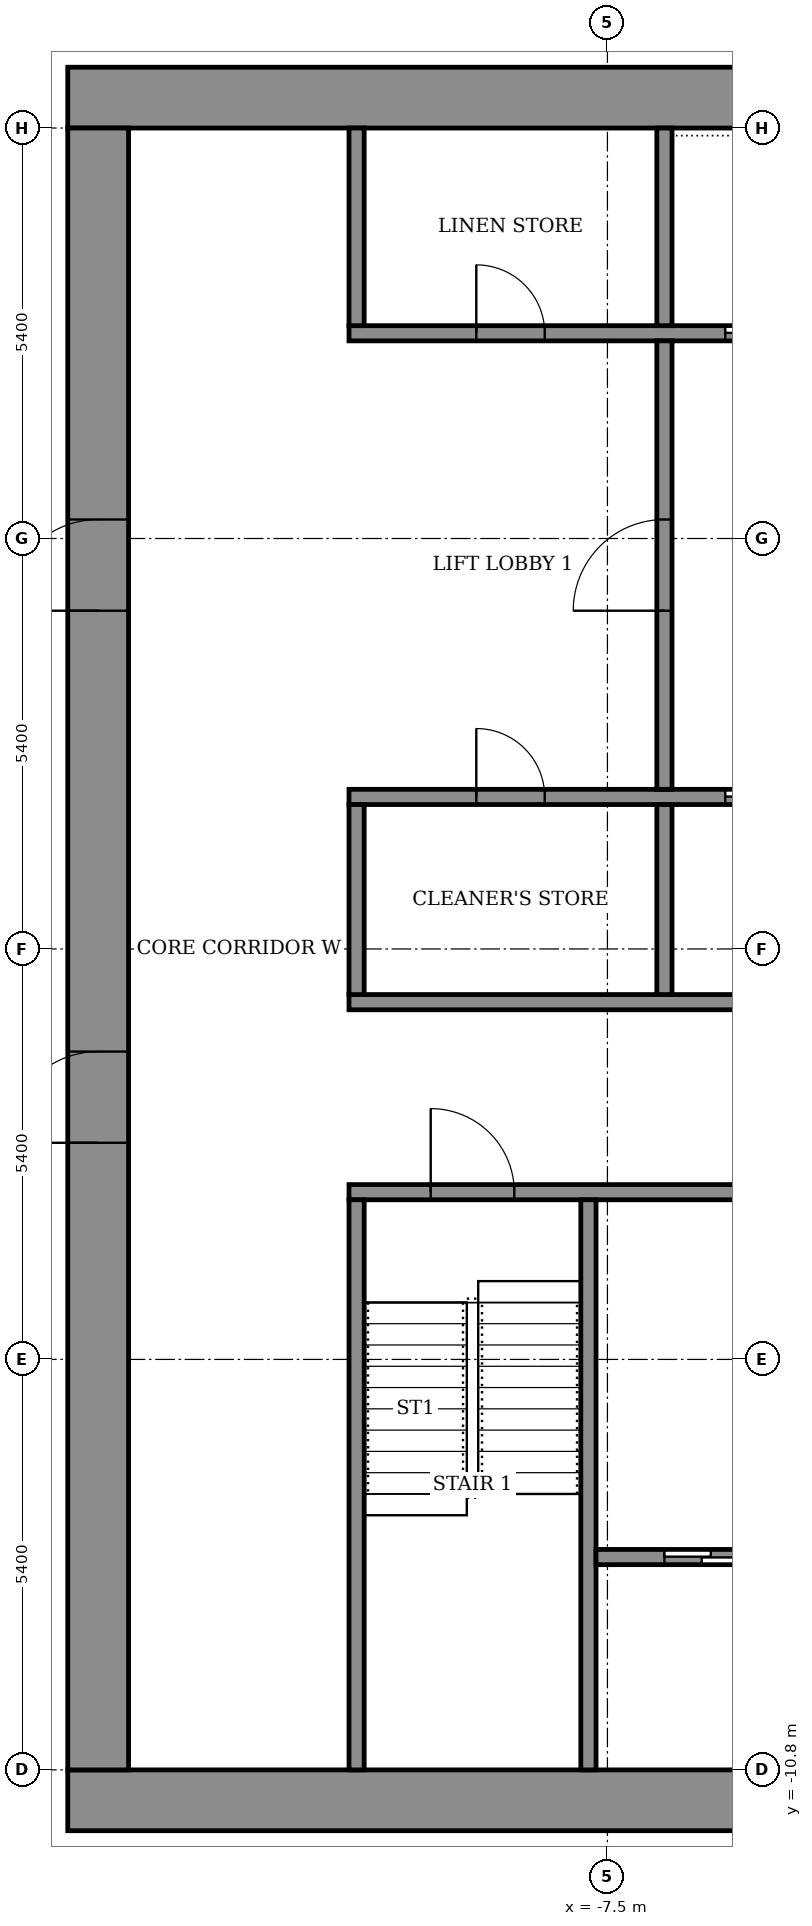
"""IFC4 building model, lengths in metres.
Left out: names, types, materials, properties, quantities, classifications, styles, units other than length and angle.
Written with IfcOpenShell. Run it as: python <this file> out.ifc"""

import sys

from ifc_helpers import new_model, si_unit, direction, frame, frame_2d, origin, place, context, subcontext, project, spatial, rectangle, extrude, element, fill, save


model = new_model("IFC4")
c1 = context("Model", 3, precision=1e-05, world=origin(), true_north=direction((0.0, 1.0)))
c2 = subcontext(c1, "Body", "Model", "MODEL_VIEW")
j1 = project(units=[si_unit("LENGTHUNIT", "METRE"), si_unit("PLANEANGLEUNIT", "RADIAN")], contexts=[c1])
p1 = place(None, origin())
s1 = spatial("IfcSite", under=j1, at=p1, CompositionType="ELEMENT")
p2 = place(p1, origin())
s2 = spatial("IfcBuilding", under=s1, at=p2, CompositionType="ELEMENT")
p3 = place(p2, frame((0.0, 0.0, 245.5)))
s3 = spatial("IfcBuildingStorey", under=s2, at=p3, CompositionType="ELEMENT", Elevation=245.5)
for number, where, z_axis, x_axis in (
    (1, (-14.6, -11.2, 0.0), (0.0, 0.0, 1.0), (1.0, 0.0, 0.0)),
    (2, (-14.6, 11.2, 0.0), (0.0, 0.0, 1.0), (1.0, 0.0, 0.0)),
):
    element("IfcWall", number, at=place(p3, frame(where, z_axis=z_axis, x_axis=x_axis)), inside=s3, PredefinedType="SHEAR", context=c2, shape_type="SweptSolid", body=[
        extrude(rectangle(XDim=29.2, YDim=0.8, at=frame_2d((14.6, 0.0))), origin(), (0.0, 0.0, 1.0), 3.6),
    ])
p4 = place(p3, frame((-14.2, -10.8, 0.0), z_axis=(0.0, 0.0, 1.0), x_axis=(0.0, 1.0, 0.0)))
e3 = element("IfcWall", 3, at=p4, inside=s3, PredefinedType="SHEAR", context=c2, shape_type="SweptSolid", body=[
    extrude(rectangle(XDim=21.6, YDim=0.8, at=frame_2d((10.8, 0.0))), origin(), (0.0, 0.0, 1.0), 3.6),
])
p5 = place(p4, frame((8.25, 0.0, 0.0)))
e4 = element("IfcOpeningElement", 4, at=p5, cuts=e3, PredefinedType="OPENING", context=c2, shape_type="SweptSolid", body=[
    extrude(rectangle(XDim=1.2, YDim=2.1, at=frame_2d((0.6, 1.05))), frame((0.0, 0.41, 0.0), z_axis=(0.0, -1.0, 0.0), x_axis=(1.0, 0.0, 0.0)), (0.0, 0.0, 1.0), 0.82),
])
p6 = place(p4, frame((15.25, 0.0, 0.0)))
e5 = element("IfcOpeningElement", 5, at=p6, cuts=e3, PredefinedType="OPENING", context=c2, shape_type="SweptSolid", body=[
    extrude(rectangle(XDim=1.2, YDim=2.1, at=frame_2d((0.6, 1.05))), frame((0.0, 0.41, 0.0), z_axis=(0.0, -1.0, 0.0), x_axis=(1.0, 0.0, 0.0)), (0.0, 0.0, 1.0), 0.82),
])
p7 = place(p3, frame((-10.9, -3.2, 0.0), z_axis=(0.0, 0.0, 1.0), x_axis=(1.0, 0.0, 0.0)))
e6 = element("IfcWall", 6, at=p7, inside=s3, PredefinedType="SHEAR", context=c2, shape_type="SweptSolid", body=[
    extrude(rectangle(XDim=21.8, YDim=0.2, at=frame_2d((10.9, 0.0))), origin(), (0.0, 0.0, 1.0), 3.05),
])
p8 = place(p7, frame((1.075, 0.0, 0.0)))
e7 = element("IfcOpeningElement", 7, at=p8, cuts=e6, PredefinedType="OPENING", context=c2, shape_type="SweptSolid", body=[
    extrude(rectangle(XDim=1.1, YDim=2.1, at=frame_2d((0.55, 1.05))), frame((0.0, 0.11, 0.0), z_axis=(0.0, -1.0, 0.0), x_axis=(1.0, 0.0, 0.0)), (0.0, 0.0, 1.0), 0.22),
])
p9 = place(p7, frame((10.325, 0.0, 0.0)))
e8 = element("IfcOpeningElement", 8, at=p9, cuts=e6, PredefinedType="OPENING", context=c2, shape_type="SweptSolid", body=[
    extrude(rectangle(XDim=1.1, YDim=2.1, at=frame_2d((0.55, 1.05))), frame((0.0, 0.11, 0.0), z_axis=(0.0, -1.0, 0.0), x_axis=(1.0, 0.0, 0.0)), (0.0, 0.0, 1.0), 0.22),
])
p10 = place(p7, frame((19.625, 0.0, 0.0)))
e9 = element("IfcOpeningElement", 9, at=p10, cuts=e6, PredefinedType="OPENING", context=c2, shape_type="SweptSolid", body=[
    extrude(rectangle(XDim=1.1, YDim=2.1, at=frame_2d((0.55, 1.05))), frame((0.0, 0.11, 0.0), z_axis=(0.0, -1.0, 0.0), x_axis=(1.0, 0.0, 0.0)), (0.0, 0.0, 1.0), 0.22),
])
p11 = place(p7, frame((5.7, 0.0, 0.0)))
e10 = element("IfcOpeningElement", 10, at=p11, cuts=e6, PredefinedType="OPENING", context=c2, shape_type="SweptSolid", body=[
    extrude(rectangle(XDim=1.1, YDim=2.1, at=frame_2d((0.55, 1.05))), frame((0.0, 0.11, 0.0), z_axis=(0.0, -1.0, 0.0), x_axis=(1.0, 0.0, 0.0)), (0.0, 0.0, 1.0), 0.22),
])
p12 = place(p7, frame((14.975, 0.0, 0.0)))
e11 = element("IfcOpeningElement", 11, at=p12, cuts=e6, PredefinedType="OPENING", context=c2, shape_type="SweptSolid", body=[
    extrude(rectangle(XDim=1.1, YDim=2.1, at=frame_2d((0.55, 1.05))), frame((0.0, 0.11, 0.0), z_axis=(0.0, -1.0, 0.0), x_axis=(1.0, 0.0, 0.0)), (0.0, 0.0, 1.0), 0.22),
])
p13 = place(p3, frame((-10.9, -0.7, 0.0), z_axis=(0.0, 0.0, 1.0), x_axis=(1.0, 0.0, 0.0)))
e12 = element("IfcWall", 12, at=p13, inside=s3, PredefinedType="SHEAR", context=c2, shape_type="SweptSolid", body=[
    extrude(rectangle(XDim=21.8, YDim=0.2, at=frame_2d((10.9, 0.0))), origin(), (0.0, 0.0, 1.0), 3.05),
])
p14 = place(p3, frame((-10.9, 2.0, 0.0), z_axis=(0.0, 0.0, 1.0), x_axis=(1.0, 0.0, 0.0)))
e13 = element("IfcWall", 13, at=p14, inside=s3, PredefinedType="SHEAR", context=c2, shape_type="SweptSolid", body=[
    extrude(rectangle(XDim=21.8, YDim=0.2, at=frame_2d((10.9, 0.0))), origin(), (0.0, 0.0, 1.0), 3.05),
])
p15 = place(p14, frame((4.95, 0.0, 0.0)))
e14 = element("IfcOpeningElement", 14, at=p15, cuts=e13, PredefinedType="OPENING", context=c2, shape_type="SweptSolid", body=[
    extrude(rectangle(XDim=1.1, YDim=2.1, at=frame_2d((0.55, 1.05))), frame((0.0, 0.11, 0.0), z_axis=(0.0, -1.0, 0.0), x_axis=(1.0, 0.0, 0.0)), (0.0, 0.0, 1.0), 0.22),
])
p16 = place(p14, frame((7.65, 0.0, 0.0)))
e15 = element("IfcOpeningElement", 15, at=p16, cuts=e13, PredefinedType="OPENING", context=c2, shape_type="SweptSolid", body=[
    extrude(rectangle(XDim=1.1, YDim=2.1, at=frame_2d((0.55, 1.05))), frame((0.0, 0.11, 0.0), z_axis=(0.0, -1.0, 0.0), x_axis=(1.0, 0.0, 0.0)), (0.0, 0.0, 1.0), 0.22),
])
p17 = place(p14, frame((10.35, 0.0, 0.0)))
e16 = element("IfcOpeningElement", 16, at=p17, cuts=e13, PredefinedType="OPENING", context=c2, shape_type="SweptSolid", body=[
    extrude(rectangle(XDim=1.1, YDim=2.1, at=frame_2d((0.55, 1.05))), frame((0.0, 0.11, 0.0), z_axis=(0.0, -1.0, 0.0), x_axis=(1.0, 0.0, 0.0)), (0.0, 0.0, 1.0), 0.22),
])
p18 = place(p14, frame((1.675, 0.0, 0.0)))
e17 = element("IfcOpeningElement", 17, at=p18, cuts=e13, PredefinedType="OPENING", context=c2, shape_type="SweptSolid", body=[
    extrude(rectangle(XDim=0.9, YDim=2.1, at=frame_2d((0.45, 1.05))), frame((0.0, 0.11, 0.0), z_axis=(0.0, -1.0, 0.0), x_axis=(1.0, 0.0, 0.0)), (0.0, 0.0, 1.0), 0.22),
])
p19 = place(p14, frame((14.5, 0.0, 0.0)))
e18 = element("IfcOpeningElement", 18, at=p19, cuts=e13, PredefinedType="OPENING", context=c2, shape_type="SweptSolid", body=[
    extrude(rectangle(XDim=0.9, YDim=2.1, at=frame_2d((0.45, 1.05))), frame((0.0, 0.11, 0.0), z_axis=(0.0, -1.0, 0.0), x_axis=(1.0, 0.0, 0.0)), (0.0, 0.0, 1.0), 0.22),
])
p20 = place(p14, frame((19.225, 0.0, 0.0)))
e19 = element("IfcOpeningElement", 19, at=p20, cuts=e13, PredefinedType="OPENING", context=c2, shape_type="SweptSolid", body=[
    extrude(rectangle(XDim=0.9, YDim=2.1, at=frame_2d((0.45, 1.05))), frame((0.0, 0.11, 0.0), z_axis=(0.0, -1.0, 0.0), x_axis=(1.0, 0.0, 0.0)), (0.0, 0.0, 1.0), 0.22),
])
p21 = place(p3, frame((-10.9, 8.1, 0.0), z_axis=(0.0, 0.0, 1.0), x_axis=(1.0, 0.0, 0.0)))
e20 = element("IfcWall", 20, at=p21, inside=s3, PredefinedType="SHEAR", context=c2, shape_type="SweptSolid", body=[
    extrude(rectangle(XDim=21.8, YDim=0.2, at=frame_2d((10.9, 0.0))), origin(), (0.0, 0.0, 1.0), 3.05),
])
p22 = place(p21, frame((4.95, 0.0, 0.0)))
e21 = element("IfcOpeningElement", 21, at=p22, cuts=e20, PredefinedType="OPENING", context=c2, shape_type="SweptSolid", body=[
    extrude(rectangle(XDim=1.1, YDim=2.1, at=frame_2d((0.55, 1.05))), frame((0.0, 0.11, 0.0), z_axis=(0.0, -1.0, 0.0), x_axis=(1.0, 0.0, 0.0)), (0.0, 0.0, 1.0), 0.22),
])
p23 = place(p21, frame((7.65, 0.0, 0.0)))
e22 = element("IfcOpeningElement", 22, at=p23, cuts=e20, PredefinedType="OPENING", context=c2, shape_type="SweptSolid", body=[
    extrude(rectangle(XDim=1.1, YDim=2.1, at=frame_2d((0.55, 1.05))), frame((0.0, 0.11, 0.0), z_axis=(0.0, -1.0, 0.0), x_axis=(1.0, 0.0, 0.0)), (0.0, 0.0, 1.0), 0.22),
])
p24 = place(p21, frame((10.35, 0.0, 0.0)))
e23 = element("IfcOpeningElement", 23, at=p24, cuts=e20, PredefinedType="OPENING", context=c2, shape_type="SweptSolid", body=[
    extrude(rectangle(XDim=1.1, YDim=2.1, at=frame_2d((0.55, 1.05))), frame((0.0, 0.11, 0.0), z_axis=(0.0, -1.0, 0.0), x_axis=(1.0, 0.0, 0.0)), (0.0, 0.0, 1.0), 0.22),
])
p25 = place(p21, frame((1.675, 0.0, 0.0)))
e24 = element("IfcOpeningElement", 24, at=p25, cuts=e20, PredefinedType="OPENING", context=c2, shape_type="SweptSolid", body=[
    extrude(rectangle(XDim=0.9, YDim=2.1, at=frame_2d((0.45, 1.05))), frame((0.0, 0.11, 0.0), z_axis=(0.0, -1.0, 0.0), x_axis=(1.0, 0.0, 0.0)), (0.0, 0.0, 1.0), 0.22),
])
p26 = place(p21, frame((14.5, 0.0, 0.0)))
e25 = element("IfcOpeningElement", 25, at=p26, cuts=e20, PredefinedType="OPENING", context=c2, shape_type="SweptSolid", body=[
    extrude(rectangle(XDim=0.9, YDim=2.1, at=frame_2d((0.45, 1.05))), frame((0.0, 0.11, 0.0), z_axis=(0.0, -1.0, 0.0), x_axis=(1.0, 0.0, 0.0)), (0.0, 0.0, 1.0), 0.22),
])
p27 = place(p21, frame((19.225, 0.0, 0.0)))
e26 = element("IfcOpeningElement", 26, at=p27, cuts=e20, PredefinedType="OPENING", context=c2, shape_type="SweptSolid", body=[
    extrude(rectangle(XDim=0.9, YDim=2.1, at=frame_2d((0.45, 1.05))), frame((0.0, 0.11, 0.0), z_axis=(0.0, -1.0, 0.0), x_axis=(1.0, 0.0, 0.0)), (0.0, 0.0, 1.0), 0.22),
])
for number, where, z_axis, x_axis in (
    (27, (-10.8, -10.8, 0.0), (0.0, 0.0, 1.0), (0.0, 1.0, 0.0)),
    (28, (-7.75, -10.8, 0.0), (0.0, 0.0, 1.0), (0.0, 1.0, 0.0)),
):
    element("IfcWall", number, at=place(p3, frame(where, z_axis=z_axis, x_axis=x_axis)), inside=s3, PredefinedType="SHEAR", context=c2, shape_type="SweptSolid", body=[
        extrude(rectangle(XDim=7.5, YDim=0.2, at=frame_2d((3.75, 0.0))), origin(), (0.0, 0.0, 1.0), 3.05),
    ])
p28 = place(p3, frame((-7.65, -8.0, 0.0), z_axis=(0.0, 0.0, 1.0), x_axis=(1.0, 0.0, 0.0)))
e29 = element("IfcWall", 29, at=p28, inside=s3, PredefinedType="SHEAR", context=c2, shape_type="SweptSolid", body=[
    extrude(rectangle(XDim=6.0, YDim=0.2, at=frame_2d((3.0, 0.0))), origin(), (0.0, 0.0, 1.0), 3.05),
])
p29 = place(p28, frame((0.9, 0.0, 0.0)))
e30 = element("IfcOpeningElement", 30, at=p29, cuts=e29, PredefinedType="OPENING", context=c2, shape_type="SweptSolid", body=[
    extrude(rectangle(XDim=1.1, YDim=2.1, at=frame_2d((0.55, 1.05))), frame((0.0, 0.11, 0.0), z_axis=(0.0, -1.0, 0.0), x_axis=(1.0, 0.0, 0.0)), (0.0, 0.0, 1.0), 0.22),
])
p30 = place(p28, frame((4.0, 0.0, 0.0)))
e31 = element("IfcOpeningElement", 31, at=p30, cuts=e29, PredefinedType="OPENING", context=c2, shape_type="SweptSolid", body=[
    extrude(rectangle(XDim=1.1, YDim=2.1, at=frame_2d((0.55, 1.05))), frame((0.0, 0.11, 0.0), z_axis=(0.0, -1.0, 0.0), x_axis=(1.0, 0.0, 0.0)), (0.0, 0.0, 1.0), 0.22),
])
p31 = place(p3, frame((-10.8, -0.6, 0.0), z_axis=(0.0, 0.0, 1.0), x_axis=(0.0, 1.0, 0.0)))
e32 = element("IfcWall", 32, at=p31, inside=s3, PredefinedType="STANDARD", context=c2, shape_type="SweptSolid", body=[
    extrude(rectangle(XDim=2.5, YDim=0.2, at=frame_2d((1.25, 0.0))), origin(), (0.0, 0.0, 1.0), 3.05),
])
p32 = place(p3, frame((-6.75, -0.6, 0.0), z_axis=(0.0, 0.0, 1.0), x_axis=(0.0, 1.0, 0.0)))
e33 = element("IfcWall", 33, at=p32, inside=s3, PredefinedType="SHEAR", context=c2, shape_type="SweptSolid", body=[
    extrude(rectangle(XDim=2.5, YDim=0.2, at=frame_2d((1.25, 0.0))), origin(), (0.0, 0.0, 1.0), 3.05),
])
p33 = place(p3, frame((-10.8, 8.2, 0.0), z_axis=(0.0, 0.0, 1.0), x_axis=(0.0, 1.0, 0.0)))
e34 = element("IfcWall", 34, at=p33, inside=s3, PredefinedType="STANDARD", context=c2, shape_type="SweptSolid", body=[
    extrude(rectangle(XDim=2.6, YDim=0.2, at=frame_2d((1.3, 0.0))), origin(), (0.0, 0.0, 1.0), 3.05),
])
p34 = place(p3, frame((-6.75, 8.2, 0.0), z_axis=(0.0, 0.0, 1.0), x_axis=(0.0, 1.0, 0.0)))
e35 = element("IfcWall", 35, at=p34, inside=s3, PredefinedType="SHEAR", context=c2, shape_type="SweptSolid", body=[
    extrude(rectangle(XDim=2.6, YDim=0.2, at=frame_2d((1.3, 0.0))), origin(), (0.0, 0.0, 1.0), 3.05),
])
p35 = place(p3, frame((-6.75, 2.1, 0.0), z_axis=(0.0, 0.0, 1.0), x_axis=(0.0, 1.0, 0.0)))
e36 = element("IfcWall", 36, at=p35, inside=s3, PredefinedType="STANDARD", context=c2, shape_type="SweptSolid", body=[
    extrude(rectangle(XDim=5.9, YDim=0.2, at=frame_2d((2.95, 0.0))), origin(), (0.0, 0.0, 1.0), 3.05),
])
p36 = place(p35, frame((2.35, 0.0, 0.0)))
e37 = element("IfcOpeningElement", 37, at=p36, cuts=e36, PredefinedType="OPENING", context=c2, shape_type="SweptSolid", body=[
    extrude(rectangle(XDim=1.2, YDim=2.1, at=frame_2d((0.6, 1.05))), frame((0.0, 0.11, 0.0), z_axis=(0.0, -1.0, 0.0), x_axis=(1.0, 0.0, 0.0)), (0.0, 0.0, 1.0), 0.22),
])
p37 = place(p5, origin())
e38 = element("IfcDoor", 38, at=p37, inside=s3, OperationType="DOUBLE_DOOR_SINGLE_SWING", PredefinedType="DOOR", context=c2, shape_type="SweptSolid", body=[
    extrude(rectangle(XDim=1.2, YDim=2.1, at=frame_2d((0.6, 1.05))), frame((0.0, 0.025, 0.0), z_axis=(0.0, -1.0, 0.0), x_axis=(1.0, 0.0, 0.0)), (0.0, 0.0, 1.0), 0.05),
])
fill(e4, e38)
p38 = place(p6, origin())
e39 = element("IfcDoor", 39, at=p38, inside=s3, OperationType="DOUBLE_DOOR_SINGLE_SWING", PredefinedType="DOOR", context=c2, shape_type="SweptSolid", body=[
    extrude(rectangle(XDim=1.2, YDim=2.1, at=frame_2d((0.6, 1.05))), frame((0.0, 0.025, 0.0), z_axis=(0.0, -1.0, 0.0), x_axis=(1.0, 0.0, 0.0)), (0.0, 0.0, 1.0), 0.05),
])
fill(e5, e39)
p39 = place(p15, origin())
e40 = element("IfcDoor", 40, at=p39, inside=s3, OperationType="SLIDING_TO_LEFT", PredefinedType="DOOR", context=c2, shape_type="SweptSolid", body=[
    extrude(rectangle(XDim=1.1, YDim=2.1, at=frame_2d((0.55, 1.05))), frame((0.0, 0.025, 0.0), z_axis=(0.0, -1.0, 0.0), x_axis=(1.0, 0.0, 0.0)), (0.0, 0.0, 1.0), 0.05),
])
fill(e14, e40)
p40 = place(p22, origin())
e41 = element("IfcDoor", 41, at=p40, inside=s3, OperationType="SLIDING_TO_LEFT", PredefinedType="DOOR", context=c2, shape_type="SweptSolid", body=[
    extrude(rectangle(XDim=1.1, YDim=2.1, at=frame_2d((0.55, 1.05))), frame((0.0, 0.025, 0.0), z_axis=(0.0, -1.0, 0.0), x_axis=(1.0, 0.0, 0.0)), (0.0, 0.0, 1.0), 0.05),
])
fill(e21, e41)
p41 = place(p18, origin())
e42 = element("IfcDoor", 42, at=p41, inside=s3, OperationType="SINGLE_SWING_RIGHT", PredefinedType="DOOR", context=c2, shape_type="SweptSolid", body=[
    extrude(rectangle(XDim=0.9, YDim=2.1, at=frame_2d((0.45, 1.05))), frame((0.0, 0.025, 0.0), z_axis=(0.0, -1.0, 0.0), x_axis=(1.0, 0.0, 0.0)), (0.0, 0.0, 1.0), 0.05),
])
fill(e17, e42)
p42 = place(p25, origin())
e43 = element("IfcDoor", 43, at=p42, inside=s3, OperationType="SINGLE_SWING_RIGHT", PredefinedType="DOOR", context=c2, shape_type="SweptSolid", body=[
    extrude(rectangle(XDim=0.9, YDim=2.1, at=frame_2d((0.45, 1.05))), frame((0.0, 0.025, 0.0), z_axis=(0.0, -1.0, 0.0), x_axis=(1.0, 0.0, 0.0)), (0.0, 0.0, 1.0), 0.05),
])
fill(e24, e43)
p43 = place(p29, origin())
e44 = element("IfcDoor", 44, at=p43, inside=s3, OperationType="SLIDING_TO_LEFT", PredefinedType="DOOR", context=c2, shape_type="SweptSolid", body=[
    extrude(rectangle(XDim=1.1, YDim=2.1, at=frame_2d((0.55, 1.05))), frame((0.0, 0.025, 0.0), z_axis=(0.0, -1.0, 0.0), x_axis=(1.0, 0.0, 0.0)), (0.0, 0.0, 1.0), 0.05),
])
fill(e30, e44)
p44 = place(p8, origin())
e45 = element("IfcDoor", 45, at=p44, inside=s3, OperationType="SINGLE_SWING_RIGHT", PredefinedType="DOOR", context=c2, shape_type="SweptSolid", body=[
    extrude(rectangle(XDim=1.1, YDim=2.1, at=frame_2d((0.55, 1.05))), frame((0.0, 0.025, 0.0), z_axis=(0.0, -1.0, 0.0), x_axis=(1.0, 0.0, 0.0)), (0.0, 0.0, 1.0), 0.05),
])
fill(e7, e45)
p45 = place(p36, origin())
e46 = element("IfcDoor", 46, at=p45, inside=s3, OperationType="SINGLE_SWING_LEFT", PredefinedType="DOOR", context=c2, shape_type="SweptSolid", body=[
    extrude(rectangle(XDim=1.2, YDim=2.1, at=frame_2d((0.6, 1.05))), frame((0.0, 0.025, 0.0), z_axis=(0.0, -1.0, 0.0), x_axis=(1.0, 0.0, 0.0)), (0.0, 0.0, 1.0), 0.05),
])
fill(e37, e46)
save(model, sys.argv[1])
